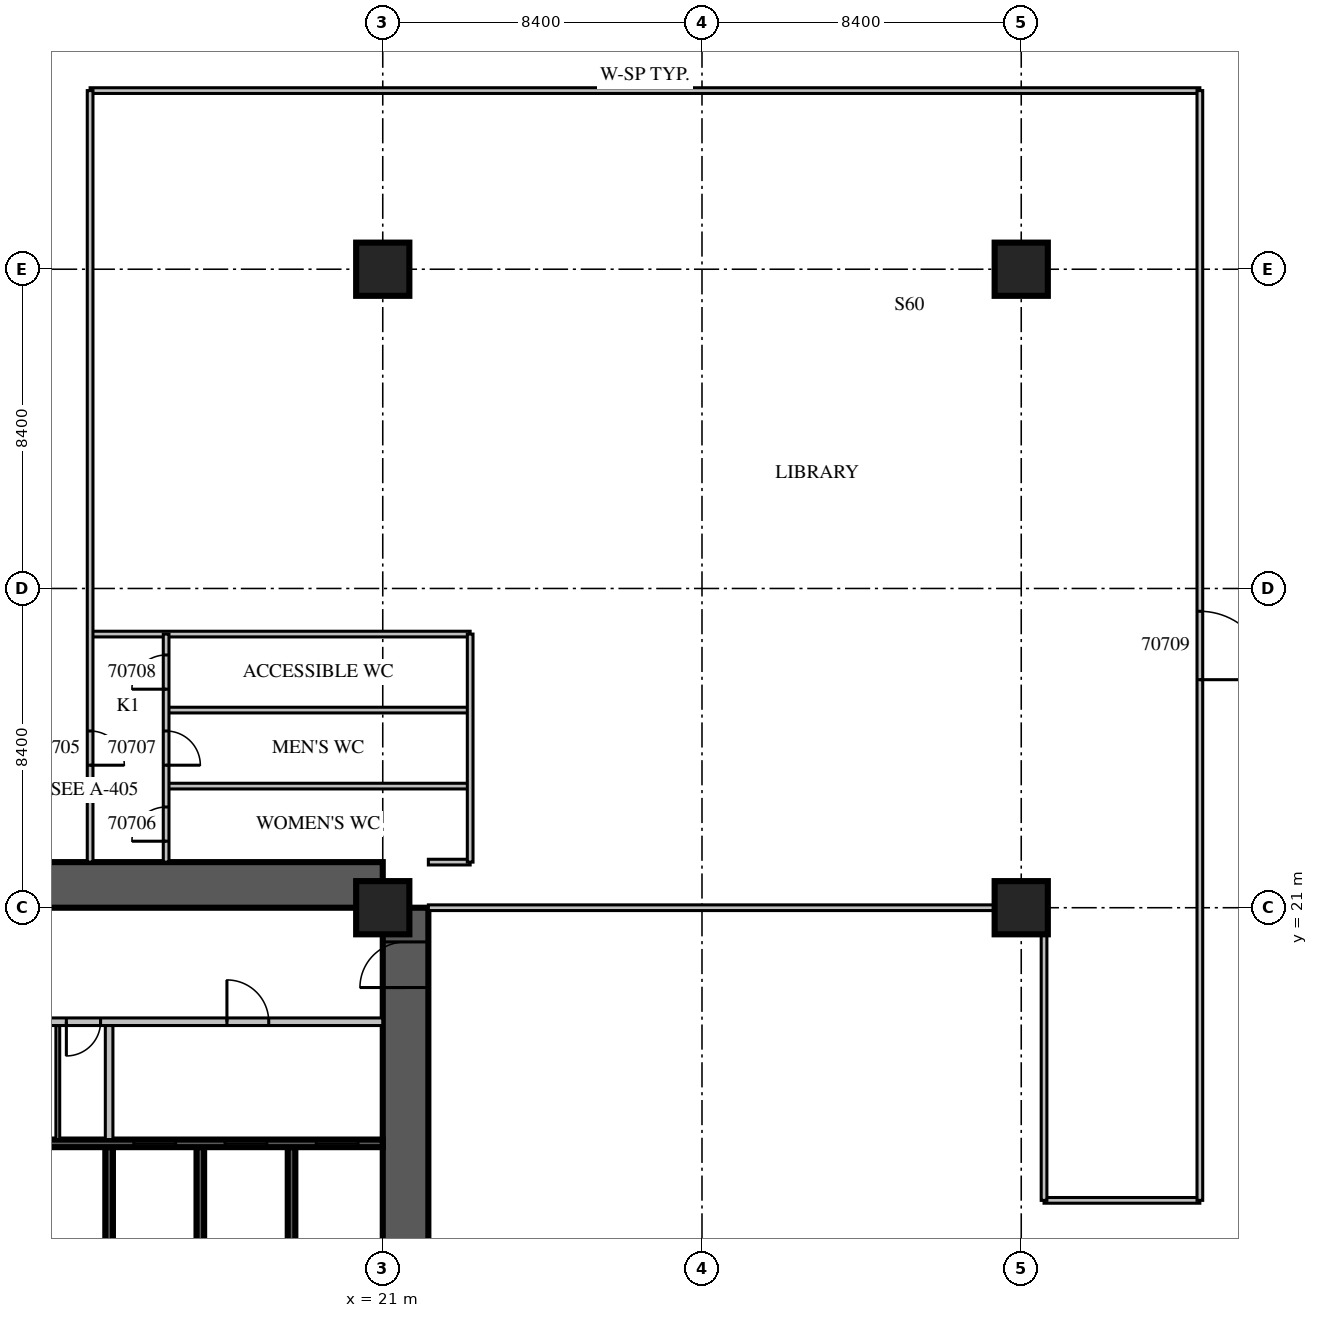
"""IFC4 building model, lengths in metres.
Left out: names, types, materials, properties, quantities, classifications, styles, units other than length and angle.
Written with IfcOpenShell. Run it as: python <this file> out.ifc"""

import sys

from ifc_helpers import new_model, si_unit, direction, frame, frame_2d, origin, origin_2d, place, context, subcontext, project, spatial, rectangle, extrude, source, transform, mapped, element, fill, save


model = new_model("IFC4")
c1 = context("Model", 3, precision=1e-05, world=origin(), true_north=direction((0.0, 1.0)))
c2 = subcontext(c1, "Body", "Model", "MODEL_VIEW")
j1 = project(units=[si_unit("LENGTHUNIT", "METRE"), si_unit("PLANEANGLEUNIT", "RADIAN")], contexts=[c1])
p1 = place(None, origin())
s1 = spatial("IfcSite", under=j1, at=p1, CompositionType="ELEMENT")
p2 = place(p1, origin())
s2 = spatial("IfcBuilding", under=s1, at=p2, CompositionType="ELEMENT")
p3 = place(p2, frame((0.0, 0.0, 23.7)))
s3 = spatial("IfcBuildingStorey", under=s2, at=p3, CompositionType="ELEMENT", Elevation=23.7)
m1 = source(origin(), c2, "Body", "SweptSolid", [
    extrude(rectangle(XDim=1.4, YDim=1.4, at=origin_2d()), origin(), (0.0, 0.0, 1.0), 5.4),
])
for number, where, z_axis, x_axis in (
    (1, (21.0, 21.0, 0.0), (0.0, 0.0, 1.0), (1.0, 0.0, 0.0)),
    (2, (21.0, 37.8, 0.0), (0.0, 0.0, 1.0), (1.0, 0.0, 0.0)),
    (3, (37.8, 21.0, 0.0), (0.0, 0.0, 1.0), (1.0, 0.0, 0.0)),
    (4, (37.8, 37.8, 0.0), (0.0, 0.0, 1.0), (1.0, 0.0, 0.0)),
):
    element("IfcColumn", number, at=place(p3, frame(where, z_axis=z_axis, x_axis=x_axis)), inside=s3, PredefinedType="COLUMN", context=c2, shape_type="MappedRepresentation", body=[
        mapped(m1, transform((0.0, 0.0, 0.0), scale=1.0)),
    ])
m2 = source(origin(), c2, "Body", "SweptSolid", [
    extrude(rectangle(XDim=16.8, YDim=1.2, at=frame_2d((8.4, 0.0))), origin(), (0.0, 0.0, 1.0), 5.4),
])
p4 = place(p3, frame((21.6, 4.2, 0.0), z_axis=(0.0, 0.0, 1.0), x_axis=(0.0, 1.0, 0.0)))
e5 = element("IfcWall", 5, at=p4, inside=s3, PredefinedType="SHEAR", context=c2, shape_type="MappedRepresentation", body=[
    mapped(m2, transform((0.0, 0.0, 0.0), scale=1.0)),
])
m3 = source(origin(), c2, "Body", "SweptSolid", [
    extrude(rectangle(XDim=2.2, YDim=2.1, at=frame_2d((1.1, 1.05))), frame((0.0, 0.61, 0.0), z_axis=(0.0, -1.0, 0.0), x_axis=(1.0, 0.0, 0.0)), (0.0, 0.0, 1.0), 1.22),
])
p5 = place(p4, frame((4.2, 0.0, 0.0)))
e6 = element("IfcOpeningElement", 6, at=p5, cuts=e5, PredefinedType="OPENING", context=c2, shape_type="MappedRepresentation", body=[
    mapped(m3, transform((0.0, 0.0, 0.0), scale=1.0)),
])
m4 = source(origin(), c2, "Body", "SweptSolid", [
    extrude(rectangle(XDim=1.2, YDim=2.1, at=frame_2d((0.6, 1.05))), frame((0.0, 0.61, 0.0), z_axis=(0.0, -1.0, 0.0), x_axis=(1.0, 0.0, 0.0)), (0.0, 0.0, 1.0), 1.22),
])
p6 = place(p4, frame((14.7, 0.0, 0.0)))
e7 = element("IfcOpeningElement", 7, at=p6, cuts=e5, PredefinedType="OPENING", context=c2, shape_type="MappedRepresentation", body=[
    mapped(m4, transform((0.0, 0.0, 0.0), scale=1.0)),
])
p7 = place(p3, frame((4.2, 21.6, 0.0), z_axis=(0.0, 0.0, 1.0), x_axis=(1.0, 0.0, 0.0)))
e8 = element("IfcWall", 8, at=p7, inside=s3, PredefinedType="SHEAR", context=c2, shape_type="MappedRepresentation", body=[
    mapped(m2, transform((0.0, 0.0, 0.0), scale=1.0)),
])
p8 = place(p7, frame((6.2, 0.0, 0.0)))
e9 = element("IfcOpeningElement", 9, at=p8, cuts=e8, PredefinedType="OPENING", context=c2, shape_type="MappedRepresentation", body=[
    mapped(m4, transform((0.0, 0.0, 0.0), scale=1.0)),
])
m5 = source(origin(), c2, "Body", "SweptSolid", [
    extrude(rectangle(XDim=3.0, YDim=0.2, at=frame_2d((1.5, 0.0))), origin(), (0.0, 0.0, 1.0), 5.4),
])
for number, where, z_axis, x_axis in (
    (10, (13.8, 11.7, 0.0), (0.0, 0.0, 1.0), (0.0, 1.0, 0.0)),
    (11, (16.2, 11.7, 0.0), (0.0, 0.0, 1.0), (0.0, 1.0, 0.0)),
    (12, (18.6, 11.7, 0.0), (0.0, 0.0, 1.0), (0.0, 1.0, 0.0)),
):
    element("IfcWall", number, at=place(p3, frame(where, z_axis=z_axis, x_axis=x_axis)), inside=s3, PredefinedType="SOLIDWALL", context=c2, shape_type="MappedRepresentation", body=[
        mapped(m5, transform((0.0, 0.0, 0.0), scale=1.0)),
    ])
m6 = source(origin(), c2, "Body", "SweptSolid", [
    extrude(rectangle(XDim=16.8, YDim=0.2, at=frame_2d((8.4, 0.0))), origin(), (0.0, 0.0, 1.0), 5.4),
])
p9 = place(p3, frame((4.2, 14.8, 0.0), z_axis=(0.0, 0.0, 1.0), x_axis=(1.0, 0.0, 0.0)))
e13 = element("IfcWall", 13, at=p9, inside=s3, PredefinedType="SOLIDWALL", context=c2, shape_type="MappedRepresentation", body=[
    mapped(m6, transform((0.0, 0.0, 0.0), scale=1.0)),
])
m7 = source(origin(), c2, "Body", "SweptSolid", [
    extrude(rectangle(XDim=1.1, YDim=2.1, at=frame_2d((0.55, 1.05))), frame((0.0, 0.11, 0.0), z_axis=(0.0, -1.0, 0.0), x_axis=(1.0, 0.0, 0.0)), (0.0, 0.0, 1.0), 0.22),
])
p10 = place(p9, frame((10.25, 0.0, 0.0)))
e14 = element("IfcOpeningElement", 14, at=p10, cuts=e13, PredefinedType="OPENING", context=c2, shape_type="MappedRepresentation", body=[
    mapped(m7, transform((0.0, 0.0, 0.0), scale=1.0)),
])
p11 = place(p9, frame((12.65, 0.0, 0.0)))
e15 = element("IfcOpeningElement", 15, at=p11, cuts=e13, PredefinedType="OPENING", context=c2, shape_type="MappedRepresentation", body=[
    mapped(m7, transform((0.0, 0.0, 0.0), scale=1.0)),
])
p12 = place(p9, frame((15.05, 0.0, 0.0)))
e16 = element("IfcOpeningElement", 16, at=p12, cuts=e13, PredefinedType="OPENING", context=c2, shape_type="MappedRepresentation", body=[
    mapped(m7, transform((0.0, 0.0, 0.0), scale=1.0)),
])
m8 = source(origin(), c2, "Body", "SweptSolid", [
    extrude(rectangle(XDim=11.45, YDim=0.2, at=frame_2d((5.725, 0.0))), origin(), (0.0, 0.0, 1.0), 4.8),
])
p13 = place(p3, frame((9.55, 18.0, 0.0), z_axis=(0.0, 0.0, 1.0), x_axis=(1.0, 0.0, 0.0)))
e17 = element("IfcWall", 17, at=p13, inside=s3, PredefinedType="PARTITIONING", context=c2, shape_type="MappedRepresentation", body=[
    mapped(m8, transform((0.0, 0.0, 0.0), scale=1.0)),
])
m9 = source(origin(), c2, "Body", "SweptSolid", [
    extrude(rectangle(XDim=0.9, YDim=2.1, at=frame_2d((0.45, 1.05))), frame((0.0, 0.11, 0.0), z_axis=(0.0, -1.0, 0.0), x_axis=(1.0, 0.0, 0.0)), (0.0, 0.0, 1.0), 0.22),
])
p14 = place(p13, frame((1.075, 0.0, 0.0)))
e18 = element("IfcOpeningElement", 18, at=p14, cuts=e17, PredefinedType="OPENING", context=c2, shape_type="MappedRepresentation", body=[
    mapped(m9, transform((0.0, 0.0, 0.0), scale=1.0)),
])
p15 = place(p13, frame((3.125, 0.0, 0.0)))
e19 = element("IfcOpeningElement", 19, at=p15, cuts=e17, PredefinedType="OPENING", context=c2, shape_type="MappedRepresentation", body=[
    mapped(m9, transform((0.0, 0.0, 0.0), scale=1.0)),
])
p16 = place(p13, frame((7.35, 0.0, 0.0)))
e20 = element("IfcOpeningElement", 20, at=p16, cuts=e17, PredefinedType="OPENING", context=c2, shape_type="MappedRepresentation", body=[
    mapped(m7, transform((0.0, 0.0, 0.0), scale=1.0)),
])
m10 = source(origin(), c2, "Body", "SweptSolid", [
    extrude(rectangle(XDim=3.0, YDim=0.2, at=frame_2d((1.5, 0.0))), origin(), (0.0, 0.0, 1.0), 4.8),
])
p17 = place(p3, frame((13.8, 14.9, 0.0), z_axis=(0.0, 0.0, 1.0), x_axis=(0.0, 1.0, 0.0)))
e21 = element("IfcWall", 21, at=p17, inside=s3, PredefinedType="PARTITIONING", context=c2, shape_type="MappedRepresentation", body=[
    mapped(m10, transform((0.0, 0.0, 0.0), scale=1.0)),
])
m11 = source(origin(), c2, "Body", "SweptSolid", [
    extrude(rectangle(XDim=3.0, YDim=0.1, at=frame_2d((1.5, 0.0))), origin(), (0.0, 0.0, 1.0), 4.8),
])
p18 = place(p3, frame((12.45, 14.9, 0.0), z_axis=(0.0, 0.0, 1.0), x_axis=(0.0, 1.0, 0.0)))
e22 = element("IfcWall", 22, at=p18, inside=s3, PredefinedType="PARTITIONING", context=c2, shape_type="MappedRepresentation", body=[
    mapped(m11, transform((0.0, 0.0, 0.0), scale=1.0)),
])
m12 = source(origin(), c2, "Body", "SweptSolid", [
    extrude(rectangle(XDim=4.1, YDim=0.15, at=frame_2d((2.05, 0.0))), origin(), (0.0, 0.0, 1.0), 4.8),
])
p19 = place(p3, frame((38.4, 13.3, 0.0), z_axis=(0.0, 0.0, 1.0), x_axis=(1.0, 0.0, 0.0)))
e23 = element("IfcWall", 23, at=p19, inside=s3, PredefinedType="PARTITIONING", context=c2, shape_type="MappedRepresentation", body=[
    mapped(m12, transform((0.0, 0.0, 0.0), scale=1.0)),
])
m13 = source(origin(), c2, "Body", "SweptSolid", [
    extrude(rectangle(XDim=16.2, YDim=0.15, at=frame_2d((8.1, 0.0))), origin(), (0.0, 0.0, 1.0), 4.8),
])
p20 = place(p3, frame((22.2, 21.0, 0.0), z_axis=(0.0, 0.0, 1.0), x_axis=(1.0, 0.0, 0.0)))
e24 = element("IfcWall", 24, at=p20, inside=s3, PredefinedType="PARTITIONING", context=c2, shape_type="MappedRepresentation", body=[
    mapped(m13, transform((0.0, 0.0, 0.0), scale=1.0)),
])
m14 = source(origin(), c2, "Body", "SweptSolid", [
    extrude(rectangle(XDim=1.1, YDim=0.15, at=frame_2d((0.55, 0.0))), origin(), (0.0, 0.0, 1.0), 4.8),
])
p21 = place(p3, frame((22.2, 22.2, 0.0), z_axis=(0.0, 0.0, 1.0), x_axis=(1.0, 0.0, 0.0)))
e25 = element("IfcWall", 25, at=p21, inside=s3, PredefinedType="PARTITIONING", context=c2, shape_type="MappedRepresentation", body=[
    mapped(m14, transform((0.0, 0.0, 0.0), scale=1.0)),
])
m15 = source(origin(), c2, "Body", "SweptSolid", [
    extrude(rectangle(XDim=8.0, YDim=0.15, at=frame_2d((4.0, 0.0))), origin(), (0.0, 0.0, 1.0), 4.8),
])
for number, where, z_axis, x_axis in (
    (26, (15.3, 24.2, 0.0), (0.0, 0.0, 1.0), (1.0, 0.0, 0.0)),
    (27, (15.3, 26.2, 0.0), (0.0, 0.0, 1.0), (1.0, 0.0, 0.0)),
):
    element("IfcWall", number, at=place(p3, frame(where, z_axis=z_axis, x_axis=x_axis)), inside=s3, PredefinedType="PARTITIONING", context=c2, shape_type="MappedRepresentation", body=[
        mapped(m15, transform((0.0, 0.0, 0.0), scale=1.0)),
    ])
m16 = source(origin(), c2, "Body", "SweptSolid", [
    extrude(rectangle(XDim=10.0, YDim=0.15, at=frame_2d((5.0, 0.0))), origin(), (0.0, 0.0, 1.0), 4.8),
])
p22 = place(p3, frame((13.3, 28.2, 0.0), z_axis=(0.0, 0.0, 1.0), x_axis=(1.0, 0.0, 0.0)))
e28 = element("IfcWall", 28, at=p22, inside=s3, PredefinedType="PARTITIONING", context=c2, shape_type="MappedRepresentation", body=[
    mapped(m16, transform((0.0, 0.0, 0.0), scale=1.0)),
])
m17 = source(origin(), c2, "Body", "SweptSolid", [
    extrude(rectangle(XDim=29.2, YDim=0.15, at=frame_2d((14.6, 0.0))), origin(), (0.0, 0.0, 1.0), 4.8),
])
p23 = place(p3, frame((13.3, 42.5, 0.0), z_axis=(0.0, 0.0, 1.0), x_axis=(1.0, 0.0, 0.0)))
e29 = element("IfcWall", 29, at=p23, inside=s3, PredefinedType="PARTITIONING", context=c2, shape_type="MappedRepresentation", body=[
    mapped(m17, transform((0.0, 0.0, 0.0), scale=1.0)),
])
m18 = source(origin(), c2, "Body", "SweptSolid", [
    extrude(rectangle(XDim=20.3, YDim=0.15, at=frame_2d((10.15, 0.0))), origin(), (0.0, 0.0, 1.0), 4.8),
])
p24 = place(p3, frame((13.3, 22.2, 0.0), z_axis=(0.0, 0.0, 1.0), x_axis=(0.0, 1.0, 0.0)))
e30 = element("IfcWall", 30, at=p24, inside=s3, PredefinedType="PARTITIONING", context=c2, shape_type="MappedRepresentation", body=[
    mapped(m18, transform((0.0, 0.0, 0.0), scale=1.0)),
])
m19 = source(origin(), c2, "Body", "SweptSolid", [
    extrude(rectangle(XDim=0.9, YDim=2.1, at=frame_2d((0.45, 1.05))), frame((0.0, 0.085, 0.0), z_axis=(0.0, -1.0, 0.0), x_axis=(1.0, 0.0, 0.0)), (0.0, 0.0, 1.0), 0.17),
])
p25 = place(p24, frame((2.55, 0.0, 0.0)))
e31 = element("IfcOpeningElement", 31, at=p25, cuts=e30, PredefinedType="OPENING", context=c2, shape_type="MappedRepresentation", body=[
    mapped(m19, transform((0.0, 0.0, 0.0), scale=1.0)),
])
m20 = source(origin(), c2, "Body", "SweptSolid", [
    extrude(rectangle(XDim=6.0, YDim=0.15, at=frame_2d((3.0, 0.0))), origin(), (0.0, 0.0, 1.0), 4.8),
])
p26 = place(p3, frame((15.3, 22.2, 0.0), z_axis=(0.0, 0.0, 1.0), x_axis=(0.0, 1.0, 0.0)))
e32 = element("IfcWall", 32, at=p26, inside=s3, PredefinedType="PARTITIONING", context=c2, shape_type="MappedRepresentation", body=[
    mapped(m20, transform((0.0, 0.0, 0.0), scale=1.0)),
])
p27 = place(p26, frame((0.55, 0.0, 0.0)))
e33 = element("IfcOpeningElement", 33, at=p27, cuts=e32, PredefinedType="OPENING", context=c2, shape_type="MappedRepresentation", body=[
    mapped(m19, transform((0.0, 0.0, 0.0), scale=1.0)),
])
p28 = place(p26, frame((2.55, 0.0, 0.0)))
e34 = element("IfcOpeningElement", 34, at=p28, cuts=e32, PredefinedType="OPENING", context=c2, shape_type="MappedRepresentation", body=[
    mapped(m19, transform((0.0, 0.0, 0.0), scale=1.0)),
])
p29 = place(p26, frame((4.55, 0.0, 0.0)))
e35 = element("IfcOpeningElement", 35, at=p29, cuts=e32, PredefinedType="OPENING", context=c2, shape_type="MappedRepresentation", body=[
    mapped(m19, transform((0.0, 0.0, 0.0), scale=1.0)),
])
p30 = place(p3, frame((23.3, 22.2, 0.0), z_axis=(0.0, 0.0, 1.0), x_axis=(0.0, 1.0, 0.0)))
e36 = element("IfcWall", 36, at=p30, inside=s3, PredefinedType="PARTITIONING", context=c2, shape_type="MappedRepresentation", body=[
    mapped(m20, transform((0.0, 0.0, 0.0), scale=1.0)),
])
m21 = source(origin(), c2, "Body", "SweptSolid", [
    extrude(rectangle(XDim=7.7, YDim=0.15, at=frame_2d((3.85, 0.0))), origin(), (0.0, 0.0, 1.0), 4.8),
])
p31 = place(p3, frame((38.4, 13.3, 0.0), z_axis=(0.0, 0.0, 1.0), x_axis=(0.0, 1.0, 0.0)))
e37 = element("IfcWall", 37, at=p31, inside=s3, PredefinedType="PARTITIONING", context=c2, shape_type="MappedRepresentation", body=[
    mapped(m21, transform((0.0, 0.0, 0.0), scale=1.0)),
])
p32 = place(p3, frame((42.5, 13.3, 0.0), z_axis=(0.0, 0.0, 1.0), x_axis=(0.0, 1.0, 0.0)))
e38 = element("IfcWall", 38, at=p32, inside=s3, PredefinedType="PARTITIONING", context=c2, shape_type="MappedRepresentation", body=[
    mapped(m17, transform((0.0, 0.0, 0.0), scale=1.0)),
])
m22 = source(origin(), c2, "Body", "SweptSolid", [
    extrude(rectangle(XDim=1.8, YDim=2.1, at=frame_2d((0.9, 1.05))), frame((0.0, 0.085, 0.0), z_axis=(0.0, -1.0, 0.0), x_axis=(1.0, 0.0, 0.0)), (0.0, 0.0, 1.0), 0.17),
])
p33 = place(p32, frame((13.7, 0.0, 0.0)))
e39 = element("IfcOpeningElement", 39, at=p33, cuts=e38, PredefinedType="OPENING", context=c2, shape_type="MappedRepresentation", body=[
    mapped(m22, transform((0.0, 0.0, 0.0), scale=1.0)),
])
m23 = source(origin(), c2, "Body", "SweptSolid", [
    extrude(rectangle(XDim=1.1, YDim=2.1, at=frame_2d((0.55, 1.05))), frame((0.0, 0.025, 0.0), z_axis=(0.0, -1.0, 0.0), x_axis=(1.0, 0.0, 0.0)), (0.0, 0.0, 1.0), 0.05),
])
p34 = place(p10, origin())
e40 = element("IfcDoor", 40, at=p34, inside=s3, OperationType="SLIDING_TO_LEFT", PredefinedType="DOOR", context=c2, shape_type="MappedRepresentation", body=[
    mapped(m23, transform((0.0, 0.0, 0.0), scale=1.0)),
])
fill(e14, e40)
p35 = place(p11, origin())
e41 = element("IfcDoor", 41, at=p35, inside=s3, OperationType="SLIDING_TO_LEFT", PredefinedType="DOOR", context=c2, shape_type="MappedRepresentation", body=[
    mapped(m23, transform((0.0, 0.0, 0.0), scale=1.0)),
])
fill(e15, e41)
p36 = place(p12, origin())
e42 = element("IfcDoor", 42, at=p36, inside=s3, OperationType="SLIDING_TO_LEFT", PredefinedType="DOOR", context=c2, shape_type="MappedRepresentation", body=[
    mapped(m23, transform((0.0, 0.0, 0.0), scale=1.0)),
])
fill(e16, e42)
m24 = source(origin(), c2, "Body", "SweptSolid", [
    extrude(rectangle(XDim=0.9, YDim=2.1, at=frame_2d((0.45, 1.05))), frame((0.0, 0.025, 0.0), z_axis=(0.0, -1.0, 0.0), x_axis=(1.0, 0.0, 0.0)), (0.0, 0.0, 1.0), 0.05),
])
p37 = place(p15, origin())
e43 = element("IfcDoor", 43, at=p37, inside=s3, OperationType="SINGLE_SWING_RIGHT", PredefinedType="DOOR", context=c2, shape_type="MappedRepresentation", body=[
    mapped(m24, transform((0.0, 0.0, 0.0), scale=1.0)),
])
fill(e19, e43)
p38 = place(p16, origin())
e44 = element("IfcDoor", 44, at=p38, inside=s3, OperationType="SINGLE_SWING_LEFT", PredefinedType="DOOR", context=c2, shape_type="MappedRepresentation", body=[
    mapped(m23, transform((0.0, 0.0, 0.0), scale=1.0)),
])
fill(e20, e44)
m25 = source(origin(), c2, "Body", "SweptSolid", [
    extrude(rectangle(XDim=1.2, YDim=2.1, at=frame_2d((0.6, 1.05))), frame((0.0, 0.025, 0.0), z_axis=(0.0, -1.0, 0.0), x_axis=(1.0, 0.0, 0.0)), (0.0, 0.0, 1.0), 0.05),
])
p39 = place(p6, origin())
e45 = element("IfcDoor", 45, at=p39, inside=s3, OperationType="SINGLE_SWING_LEFT", PredefinedType="DOOR", context=c2, shape_type="MappedRepresentation", body=[
    mapped(m25, transform((0.0, 0.0, 0.0), scale=1.0)),
])
fill(e7, e45)
p40 = place(p25, origin())
e46 = element("IfcDoor", 46, at=p40, inside=s3, OperationType="SINGLE_SWING_RIGHT", PredefinedType="DOOR", context=c2, shape_type="MappedRepresentation", body=[
    mapped(m24, transform((0.0, 0.0, 0.0), scale=1.0)),
])
fill(e31, e46)
p41 = place(p27, origin())
e47 = element("IfcDoor", 47, at=p41, inside=s3, OperationType="SINGLE_SWING_LEFT", PredefinedType="DOOR", context=c2, shape_type="MappedRepresentation", body=[
    mapped(m24, transform((0.0, 0.0, 0.0), scale=1.0)),
])
fill(e33, e47)
p42 = place(p28, origin())
e48 = element("IfcDoor", 48, at=p42, inside=s3, OperationType="SINGLE_SWING_RIGHT", PredefinedType="DOOR", context=c2, shape_type="MappedRepresentation", body=[
    mapped(m24, transform((0.0, 0.0, 0.0), scale=1.0)),
])
fill(e34, e48)
p43 = place(p29, origin())
e49 = element("IfcDoor", 49, at=p43, inside=s3, OperationType="SINGLE_SWING_LEFT", PredefinedType="DOOR", context=c2, shape_type="MappedRepresentation", body=[
    mapped(m24, transform((0.0, 0.0, 0.0), scale=1.0)),
])
fill(e35, e49)
m26 = source(origin(), c2, "Body", "SweptSolid", [
    extrude(rectangle(XDim=1.8, YDim=2.1, at=frame_2d((0.9, 1.05))), frame((0.0, 0.025, 0.0), z_axis=(0.0, -1.0, 0.0), x_axis=(1.0, 0.0, 0.0)), (0.0, 0.0, 1.0), 0.05),
])
p44 = place(p33, origin())
e50 = element("IfcDoor", 50, at=p44, inside=s3, OperationType="DOUBLE_DOOR_SINGLE_SWING", PredefinedType="DOOR", context=c2, shape_type="MappedRepresentation", body=[
    mapped(m26, transform((0.0, 0.0, 0.0), scale=1.0)),
])
fill(e39, e50)
save(model, sys.argv[1])
